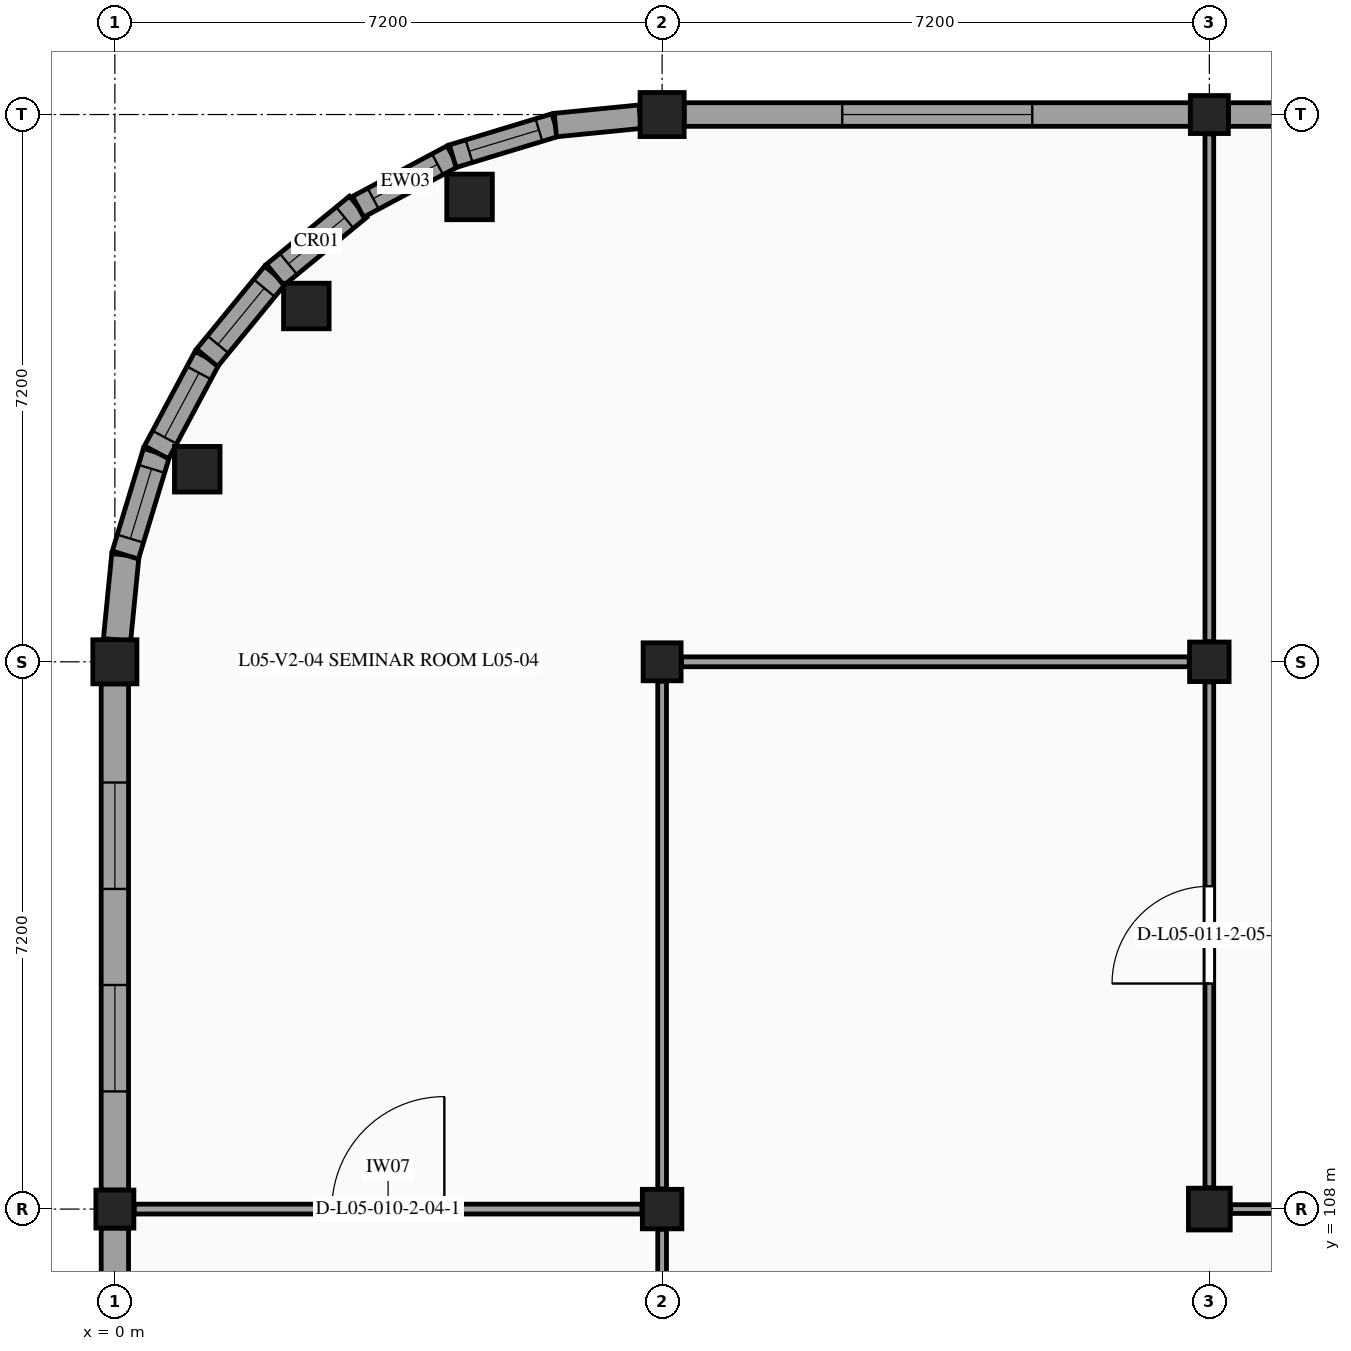
"""IFC4 building model, lengths in metres.
Left out: names, types, materials, properties, quantities, classifications, styles, units other than length and angle.
Written with IfcOpenShell. Run it as: python <this file> out.ifc"""

import sys

from ifc_helpers import new_model, si_unit, direction, frame, frame_2d, origin, origin_2d, place, context, subcontext, project, spatial, rectangle, circle, extrude, element, fill, save


model = new_model("IFC4")
c1 = context("Model", 3, precision=1e-05, world=origin(), true_north=direction((0.0, 1.0)))
c2 = subcontext(c1, "Body", "Model", "MODEL_VIEW")
j1 = project(units=[si_unit("LENGTHUNIT", "METRE"), si_unit("PLANEANGLEUNIT", "RADIAN")], contexts=[c1])
p1 = place(None, origin())
s1 = spatial("IfcSite", under=j1, at=p1, CompositionType="ELEMENT")
p2 = place(p1, origin())
s2 = spatial("IfcBuilding", under=s1, at=p2, CompositionType="ELEMENT")
p3 = place(p2, frame((0.0, 0.0, 22.8)))
s3 = spatial("IfcBuildingStorey", under=s2, at=p3, CompositionType="ELEMENT", Elevation=22.8)
p4 = place(p3, frame((0.0, 108.0, 0.0), z_axis=(0.0, 0.0, 1.0), x_axis=(1.0, 0.0, 0.0)))
e1 = element("IfcColumn", 1, at=p4, inside=s3, PredefinedType="COLUMN", context=c2, shape_type="SweptSolid", body=[
    extrude(rectangle(XDim=0.5, YDim=0.5, at=origin_2d()), origin(), (0.0, 0.0, 1.0), 3.9),
])
p5 = place(p3, frame((0.0, 115.2, 0.0), z_axis=(0.0, 0.0, 1.0), x_axis=(1.0, 0.0, 0.0)))
e2 = element("IfcColumn", 2, at=p5, inside=s3, PredefinedType="COLUMN", context=c2, shape_type="SweptSolid", body=[
    extrude(rectangle(XDim=0.58, YDim=0.58, at=origin_2d()), origin(), (0.0, 0.0, 1.0), 3.9),
])
p6 = place(p3, frame((7.2, 108.0, 0.0), z_axis=(0.0, 0.0, 1.0), x_axis=(1.0, 0.0, 0.0)))
e3 = element("IfcColumn", 3, at=p6, inside=s3, PredefinedType="COLUMN", context=c2, shape_type="SweptSolid", body=[
    extrude(rectangle(XDim=0.52, YDim=0.52, at=origin_2d()), origin(), (0.0, 0.0, 1.0), 3.9),
])
p7 = place(p3, frame((7.2, 115.2, 0.0), z_axis=(0.0, 0.0, 1.0), x_axis=(1.0, 0.0, 0.0)))
e4 = element("IfcColumn", 4, at=p7, inside=s3, PredefinedType="COLUMN", context=c2, shape_type="SweptSolid", body=[
    extrude(rectangle(XDim=0.5, YDim=0.5, at=origin_2d()), origin(), (0.0, 0.0, 1.0), 3.9),
])
p8 = place(p3, frame((7.2, 122.4, 0.0), z_axis=(0.0, 0.0, 1.0), x_axis=(1.0, 0.0, 0.0)))
e5 = element("IfcColumn", 5, at=p8, inside=s3, PredefinedType="COLUMN", context=c2, shape_type="SweptSolid", body=[
    extrude(rectangle(XDim=0.58, YDim=0.58, at=origin_2d()), origin(), (0.0, 0.0, 1.0), 3.9),
])
p9 = place(p3, frame((14.4, 108.0, 0.0), z_axis=(0.0, 0.0, 1.0), x_axis=(1.0, 0.0, 0.0)))
e6 = element("IfcColumn", 6, at=p9, inside=s3, PredefinedType="COLUMN", context=c2, shape_type="SweptSolid", body=[
    extrude(rectangle(XDim=0.55, YDim=0.55, at=origin_2d()), origin(), (0.0, 0.0, 1.0), 3.9),
])
p10 = place(p3, frame((14.4, 115.2, 0.0), z_axis=(0.0, 0.0, 1.0), x_axis=(1.0, 0.0, 0.0)))
e7 = element("IfcColumn", 7, at=p10, inside=s3, PredefinedType="COLUMN", context=c2, shape_type="SweptSolid", body=[
    extrude(rectangle(XDim=0.52, YDim=0.52, at=origin_2d()), origin(), (0.0, 0.0, 1.0), 3.9),
])
p11 = place(p3, frame((14.4, 122.4, 0.0), z_axis=(0.0, 0.0, 1.0), x_axis=(1.0, 0.0, 0.0)))
e8 = element("IfcColumn", 8, at=p11, inside=s3, PredefinedType="COLUMN", context=c2, shape_type="SweptSolid", body=[
    extrude(rectangle(XDim=0.5, YDim=0.5, at=origin_2d()), origin(), (0.0, 0.0, 1.0), 3.9),
])
for number, where, z_axis, x_axis in (
    (9, (4.667, 121.316, 0.0), (0.0, 0.0, 1.0), (1.0, 0.0, 0.0)),
    (10, (2.519, 119.881, 0.0), (0.0, 0.0, 1.0), (1.0, 0.0, 0.0)),
    (11, (1.084, 117.733, 0.0), (0.0, 0.0, 1.0), (1.0, 0.0, 0.0)),
):
    element("IfcColumn", number, at=place(p3, frame(where, z_axis=z_axis, x_axis=x_axis)), inside=s3, PredefinedType="COLUMN", context=c2, shape_type="SweptSolid", body=[
        extrude(circle(Radius=0.3, at=origin_2d()), origin(), (0.0, 0.0, 1.0), 3.9),
    ])
p12 = place(p3, frame((0.0, 101.06, 0.0), z_axis=(0.0, 0.0, 1.0), x_axis=(0.0, 1.0, 0.0)))
e12 = element("IfcWall", 12, at=p12, inside=s3, PredefinedType="STANDARD", context=c2, shape_type="SweptSolid", body=[
    extrude(rectangle(XDim=6.69, YDim=0.36, at=frame_2d((3.345, 0.0))), origin(), (0.0, 0.0, 1.0), 3.095),
])
p13 = place(p12, frame((1.232, 0.0, 1.15)))
e13 = element("IfcOpeningElement", 13, at=p13, cuts=e12, PredefinedType="OPENING", context=c2, shape_type="SweptSolid", body=[
    extrude(rectangle(XDim=1.55, YDim=1.35, at=frame_2d((0.775, 0.675))), frame((0.0, 0.19, 0.0), z_axis=(0.0, -1.0, 0.0), x_axis=(1.0, 0.0, 0.0)), (0.0, 0.0, 1.0), 0.38),
])
p14 = place(p12, frame((3.908, 0.0, 1.15)))
e14 = element("IfcOpeningElement", 14, at=p14, cuts=e12, PredefinedType="OPENING", context=c2, shape_type="SweptSolid", body=[
    extrude(rectangle(XDim=1.55, YDim=1.35, at=frame_2d((0.775, 0.675))), frame((0.0, 0.19, 0.0), z_axis=(0.0, -1.0, 0.0), x_axis=(1.0, 0.0, 0.0)), (0.0, 0.0, 1.0), 0.38),
])
p15 = place(p3, frame((0.0, 108.25, 0.0), z_axis=(0.0, 0.0, 1.0), x_axis=(0.0, 1.0, 0.0)))
e15 = element("IfcWall", 15, at=p15, inside=s3, PredefinedType="STANDARD", context=c2, shape_type="SweptSolid", body=[
    extrude(rectangle(XDim=6.66, YDim=0.36, at=frame_2d((3.33, 0.0))), origin(), (0.0, 0.0, 1.0), 3.095),
])
p16 = place(p15, frame((1.298, 0.0, 1.15)))
e16 = element("IfcOpeningElement", 16, at=p16, cuts=e15, PredefinedType="OPENING", context=c2, shape_type="SweptSolid", body=[
    extrude(rectangle(XDim=1.4, YDim=1.3, at=frame_2d((0.7, 0.65))), frame((0.0, 0.19, 0.0), z_axis=(0.0, -1.0, 0.0), x_axis=(1.0, 0.0, 0.0)), (0.0, 0.0, 1.0), 0.38),
])
p17 = place(p15, frame((3.962, 0.0, 1.15)))
e17 = element("IfcOpeningElement", 17, at=p17, cuts=e15, PredefinedType="OPENING", context=c2, shape_type="SweptSolid", body=[
    extrude(rectangle(XDim=1.4, YDim=1.3, at=frame_2d((0.7, 0.65))), frame((0.0, 0.19, 0.0), z_axis=(0.0, -1.0, 0.0), x_axis=(1.0, 0.0, 0.0)), (0.0, 0.0, 1.0), 0.38),
])
p18 = place(p3, frame((0.028, 115.489, 0.0), z_axis=(0.0, 0.0, 1.0), x_axis=(0.098167460497, 0.995169909965, 0.0)))
e18 = element("IfcWall", 18, at=p18, inside=s3, PredefinedType="STANDARD", context=c2, shape_type="SweptSolid", body=[
    extrude(rectangle(XDim=1.122, YDim=0.36, at=frame_2d((0.561, 0.0))), origin(), (0.0, 0.0, 1.0), 3.67),
])
p19 = place(p3, frame((0.138, 116.605, 0.0), z_axis=(0.0, 0.0, 1.0), x_axis=(0.290266641956, 0.956945806495, 0.0)))
e19 = element("IfcWall", 19, at=p19, inside=s3, PredefinedType="STANDARD", context=c2, shape_type="SweptSolid", body=[
    extrude(rectangle(XDim=1.411, YDim=0.36, at=frame_2d((0.706, 0.0))), origin(), (0.0, 0.0, 1.0), 3.67),
])
p20 = place(p19, frame((0.226, 0.0, 1.0)))
e20 = element("IfcOpeningElement", 20, at=p20, cuts=e19, PredefinedType="OPENING", context=c2, shape_type="SweptSolid", body=[
    extrude(rectangle(XDim=0.96, YDim=1.4, at=frame_2d((0.48, 0.7))), frame((0.0, 0.19, 0.0), z_axis=(0.0, -1.0, 0.0), x_axis=(1.0, 0.0, 0.0)), (0.0, 0.0, 1.0), 0.38),
])
p21 = place(p3, frame((0.548, 117.955, 0.0), z_axis=(0.0, 0.0, 1.0), x_axis=(0.471333199182, 0.881955222984, 0.0)))
e21 = element("IfcWall", 21, at=p21, inside=s3, PredefinedType="STANDARD", context=c2, shape_type="SweptSolid", body=[
    extrude(rectangle(XDim=1.411, YDim=0.36, at=frame_2d((0.706, 0.0))), origin(), (0.0, 0.0, 1.0), 3.67),
])
p22 = place(p21, frame((0.226, 0.0, 1.0)))
e22 = element("IfcOpeningElement", 22, at=p22, cuts=e21, PredefinedType="OPENING", context=c2, shape_type="SweptSolid", body=[
    extrude(rectangle(XDim=0.96, YDim=1.4, at=frame_2d((0.48, 0.7))), frame((0.0, 0.19, 0.0), z_axis=(0.0, -1.0, 0.0), x_axis=(1.0, 0.0, 0.0)), (0.0, 0.0, 1.0), 0.38),
])
p23 = place(p3, frame((1.213, 119.2, 0.0), z_axis=(0.0, 0.0, 1.0), x_axis=(0.634433227965, 0.772977670605, 0.0)))
e23 = element("IfcWall", 23, at=p23, inside=s3, PredefinedType="STANDARD", context=c2, shape_type="SweptSolid", body=[
    extrude(rectangle(XDim=1.412, YDim=0.36, at=frame_2d((0.706, 0.0))), origin(), (0.0, 0.0, 1.0), 3.67),
])
p24 = place(p23, frame((0.226, 0.0, 1.0)))
e24 = element("IfcOpeningElement", 24, at=p24, cuts=e23, PredefinedType="OPENING", context=c2, shape_type="SweptSolid", body=[
    extrude(rectangle(XDim=0.96, YDim=1.4, at=frame_2d((0.48, 0.7))), frame((0.0, 0.19, 0.0), z_axis=(0.0, -1.0, 0.0), x_axis=(1.0, 0.0, 0.0)), (0.0, 0.0, 1.0), 0.38),
])
p25 = place(p3, frame((2.109, 120.291, 0.0), z_axis=(0.0, 0.0, 1.0), x_axis=(0.773062495189, 0.63432986571, 0.0)))
e25 = element("IfcWall", 25, at=p25, inside=s3, PredefinedType="STANDARD", context=c2, shape_type="SweptSolid", body=[
    extrude(rectangle(XDim=1.411, YDim=0.36, at=frame_2d((0.706, 0.0))), origin(), (0.0, 0.0, 1.0), 3.67),
])
p26 = place(p25, frame((0.226, 0.0, 1.0)))
e26 = element("IfcOpeningElement", 26, at=p26, cuts=e25, PredefinedType="OPENING", context=c2, shape_type="SweptSolid", body=[
    extrude(rectangle(XDim=0.96, YDim=1.4, at=frame_2d((0.48, 0.7))), frame((0.0, 0.19, 0.0), z_axis=(0.0, -1.0, 0.0), x_axis=(1.0, 0.0, 0.0)), (0.0, 0.0, 1.0), 0.38),
])
p27 = place(p3, frame((3.2, 121.187, 0.0), z_axis=(0.0, 0.0, 1.0), x_axis=(0.881844864465, 0.471539643102, 0.0)))
e27 = element("IfcWall", 27, at=p27, inside=s3, PredefinedType="STANDARD", context=c2, shape_type="SweptSolid", body=[
    extrude(rectangle(XDim=1.411, YDim=0.31, at=frame_2d((0.706, 0.0))), origin(), (0.0, 0.0, 1.0), 3.67),
])
p28 = place(p27, frame((0.226, 0.0, 1.0)))
e28 = element("IfcOpeningElement", 28, at=p28, cuts=e27, PredefinedType="OPENING", context=c2, shape_type="SweptSolid", body=[
    extrude(rectangle(XDim=0.96, YDim=1.4, at=frame_2d((0.48, 0.7))), frame((0.0, 0.165, 0.0), z_axis=(0.0, -1.0, 0.0), x_axis=(1.0, 0.0, 0.0)), (0.0, 0.0, 1.0), 0.33),
])
p29 = place(p3, frame((4.445, 121.852, 0.0), z_axis=(0.0, 0.0, 1.0), x_axis=(0.95696037757, 0.290218599957, 0.0)))
e29 = element("IfcWall", 29, at=p29, inside=s3, PredefinedType="STANDARD", context=c2, shape_type="SweptSolid", body=[
    extrude(rectangle(XDim=1.412, YDim=0.31, at=frame_2d((0.706, 0.0))), origin(), (0.0, 0.0, 1.0), 3.67),
])
p30 = place(p29, frame((0.226, 0.0, 1.0)))
e30 = element("IfcOpeningElement", 30, at=p30, cuts=e29, PredefinedType="OPENING", context=c2, shape_type="SweptSolid", body=[
    extrude(rectangle(XDim=0.96, YDim=1.4, at=frame_2d((0.48, 0.7))), frame((0.0, 0.165, 0.0), z_axis=(0.0, -1.0, 0.0), x_axis=(1.0, 0.0, 0.0)), (0.0, 0.0, 1.0), 0.33),
])
p31 = place(p3, frame((5.795, 122.262, 0.0), z_axis=(0.0, 0.0, 1.0), x_axis=(0.995189062464, 0.097973108315, 0.0)))
e31 = element("IfcWall", 31, at=p31, inside=s3, PredefinedType="STANDARD", context=c2, shape_type="SweptSolid", body=[
    extrude(rectangle(XDim=1.121, YDim=0.31, at=frame_2d((0.561, 0.0))), origin(), (0.0, 0.0, 1.0), 3.67),
])
p32 = place(p3, frame((7.49, 122.4, 0.0), z_axis=(0.0, 0.0, 1.0), x_axis=(1.0, 0.0, 0.0)))
e32 = element("IfcWall", 32, at=p32, inside=s3, PredefinedType="STANDARD", context=c2, shape_type="SweptSolid", body=[
    extrude(rectangle(XDim=6.66, YDim=0.31, at=frame_2d((3.33, 0.0))), origin(), (0.0, 0.0, 1.0), 3.095),
])
p33 = place(p32, frame((2.08, 0.0, 0.98)))
e33 = element("IfcOpeningElement", 33, at=p33, cuts=e32, PredefinedType="OPENING", context=c2, shape_type="SweptSolid", body=[
    extrude(rectangle(XDim=2.5, YDim=1.35, at=frame_2d((1.25, 0.675))), frame((0.0, 0.165, 0.0), z_axis=(0.0, -1.0, 0.0), x_axis=(1.0, 0.0, 0.0)), (0.0, 0.0, 1.0), 0.33),
])
p34 = place(p3, frame((14.65, 122.4, 0.0), z_axis=(0.0, 0.0, 1.0), x_axis=(1.0, 0.0, 0.0)))
e34 = element("IfcWall", 34, at=p34, inside=s3, PredefinedType="STANDARD", context=c2, shape_type="SweptSolid", body=[
    extrude(rectangle(XDim=6.69, YDim=0.31, at=frame_2d((3.345, 0.0))), origin(), (0.0, 0.0, 1.0), 3.095),
])
p35 = place(p34, frame((2.295, 0.0, 0.98)))
e35 = element("IfcOpeningElement", 35, at=p35, cuts=e34, PredefinedType="OPENING", context=c2, shape_type="SweptSolid", body=[
    extrude(rectangle(XDim=2.1, YDim=1.3, at=frame_2d((1.05, 0.65))), frame((0.0, 0.165, 0.0), z_axis=(0.0, -1.0, 0.0), x_axis=(1.0, 0.0, 0.0)), (0.0, 0.0, 1.0), 0.33),
])
p36 = place(p3, frame((7.2, 101.08, 0.0), z_axis=(0.0, 0.0, 1.0), x_axis=(0.0, 1.0, 0.0)))
e36 = element("IfcWall", 36, at=p36, inside=s3, PredefinedType="PARTITIONING", context=c2, shape_type="SweptSolid", body=[
    extrude(rectangle(XDim=6.655, YDim=0.115, at=frame_2d((3.328, 0.0))), origin(), (0.0, 0.0, 1.0), 3.205),
])
p37 = place(p36, frame((2.528, 0.0, 0.0)))
e37 = element("IfcOpeningElement", 37, at=p37, cuts=e36, PredefinedType="OPENING", context=c2, shape_type="SweptSolid", body=[
    extrude(rectangle(XDim=1.6, YDim=2.2, at=frame_2d((0.8, 1.1))), frame((0.0, 0.067, 0.0), z_axis=(0.0, -1.0, 0.0), x_axis=(1.0, 0.0, 0.0)), (0.0, 0.0, 1.0), 0.135),
])
p38 = place(p3, frame((0.255, 108.0, 0.0), z_axis=(0.0, 0.0, 1.0), x_axis=(1.0, 0.0, 0.0)))
e38 = element("IfcWall", 38, at=p38, inside=s3, PredefinedType="PARTITIONING", context=c2, shape_type="SweptSolid", body=[
    extrude(rectangle(XDim=6.68, YDim=0.13, at=frame_2d((3.34, 0.0))), origin(), (0.0, 0.0, 1.0), 3.2),
])
p39 = place(p38, frame((2.6, 0.0, 0.0)))
e39 = element("IfcOpeningElement", 39, at=p39, cuts=e38, PredefinedType="OPENING", context=c2, shape_type="SweptSolid", body=[
    extrude(rectangle(XDim=1.48, YDim=2.28, at=frame_2d((0.74, 1.14))), frame((0.0, 0.075, 0.0), z_axis=(0.0, -1.0, 0.0), x_axis=(1.0, 0.0, 0.0)), (0.0, 0.0, 1.0), 0.15),
])
p40 = place(p3, frame((7.2, 108.265, 0.0), z_axis=(0.0, 0.0, 1.0), x_axis=(0.0, 1.0, 0.0)))
e40 = element("IfcWall", 40, at=p40, inside=s3, PredefinedType="PARTITIONING", context=c2, shape_type="SweptSolid", body=[
    extrude(rectangle(XDim=6.68, YDim=0.115, at=frame_2d((3.34, 0.0))), origin(), (0.0, 0.0, 1.0), 3.27),
])
p41 = place(p3, frame((14.4, 108.28, 0.0), z_axis=(0.0, 0.0, 1.0), x_axis=(0.0, 1.0, 0.0)))
e41 = element("IfcWall", 41, at=p41, inside=s3, PredefinedType="PARTITIONING", context=c2, shape_type="SweptSolid", body=[
    extrude(rectangle(XDim=6.655, YDim=0.115, at=frame_2d((3.328, 0.0))), origin(), (0.0, 0.0, 1.0), 3.27),
])
p42 = place(p41, frame((2.688, 0.0, 0.0)))
e42 = element("IfcOpeningElement", 42, at=p42, cuts=e41, PredefinedType="OPENING", context=c2, shape_type="SweptSolid", body=[
    extrude(rectangle(XDim=1.28, YDim=2.24, at=frame_2d((0.64, 1.12))), frame((0.0, 0.067, 0.0), z_axis=(0.0, -1.0, 0.0), x_axis=(1.0, 0.0, 0.0)), (0.0, 0.0, 1.0), 0.135),
])
p43 = place(p3, frame((7.455, 115.2, 0.0), z_axis=(0.0, 0.0, 1.0), x_axis=(1.0, 0.0, 0.0)))
e43 = element("IfcWall", 43, at=p43, inside=s3, PredefinedType="PARTITIONING", context=c2, shape_type="SweptSolid", body=[
    extrude(rectangle(XDim=6.68, YDim=0.13, at=frame_2d((3.34, 0.0))), origin(), (0.0, 0.0, 1.0), 3.24),
])
p44 = place(p3, frame((14.4, 115.465, 0.0), z_axis=(0.0, 0.0, 1.0), x_axis=(0.0, 1.0, 0.0)))
e44 = element("IfcWall", 44, at=p44, inside=s3, PredefinedType="PARTITIONING", context=c2, shape_type="SweptSolid", body=[
    extrude(rectangle(XDim=6.68, YDim=0.115, at=frame_2d((3.34, 0.0))), origin(), (0.0, 0.0, 1.0), 3.265),
])
p45 = place(p3, frame((14.68, 108.0, 0.0), z_axis=(0.0, 0.0, 1.0), x_axis=(1.0, 0.0, 0.0)))
e45 = element("IfcWall", 45, at=p45, inside=s3, PredefinedType="PARTITIONING", context=c2, shape_type="SweptSolid", body=[
    extrude(rectangle(XDim=6.625, YDim=0.115, at=frame_2d((3.312, 0.0))), origin(), (0.0, 0.0, 1.0), 3.25),
])
p46 = place(p16, origin())
e46 = element("IfcWindow", 46, at=p46, inside=s3, PartitioningType="SINGLE_PANEL", PredefinedType="WINDOW", context=c2, shape_type="SweptSolid", body=[
    extrude(rectangle(XDim=1.4, YDim=1.3, at=frame_2d((0.7, 0.65))), frame((0.0, -0.08, 0.0), z_axis=(0.0, -1.0, 0.0), x_axis=(1.0, 0.0, 0.0)), (0.0, 0.0, 1.0), 0.06),
])
fill(e16, e46)
p47 = place(p17, origin())
e47 = element("IfcWindow", 47, at=p47, inside=s3, PartitioningType="SINGLE_PANEL", PredefinedType="WINDOW", context=c2, shape_type="SweptSolid", body=[
    extrude(rectangle(XDim=1.4, YDim=1.3, at=frame_2d((0.7, 0.65))), frame((0.0, -0.08, 0.0), z_axis=(0.0, -1.0, 0.0), x_axis=(1.0, 0.0, 0.0)), (0.0, 0.0, 1.0), 0.06),
])
fill(e17, e47)
p48 = place(p20, origin())
e48 = element("IfcWindow", 48, at=p48, inside=s3, PartitioningType="SINGLE_PANEL", PredefinedType="WINDOW", context=c2, shape_type="SweptSolid", body=[
    extrude(rectangle(XDim=0.96, YDim=1.4, at=frame_2d((0.48, 0.7))), frame((0.0, -0.01, 0.0), z_axis=(0.0, -1.0, 0.0), x_axis=(1.0, 0.0, 0.0)), (0.0, 0.0, 1.0), 0.06),
])
fill(e20, e48)
p49 = place(p22, origin())
e49 = element("IfcWindow", 49, at=p49, inside=s3, PartitioningType="SINGLE_PANEL", PredefinedType="WINDOW", context=c2, shape_type="SweptSolid", body=[
    extrude(rectangle(XDim=0.96, YDim=1.4, at=frame_2d((0.48, 0.7))), frame((0.0, -0.01, 0.0), z_axis=(0.0, -1.0, 0.0), x_axis=(1.0, 0.0, 0.0)), (0.0, 0.0, 1.0), 0.06),
])
fill(e22, e49)
p50 = place(p24, origin())
e50 = element("IfcWindow", 50, at=p50, inside=s3, PartitioningType="SINGLE_PANEL", PredefinedType="WINDOW", context=c2, shape_type="SweptSolid", body=[
    extrude(rectangle(XDim=0.96, YDim=1.4, at=frame_2d((0.48, 0.7))), frame((0.0, -0.01, 0.0), z_axis=(0.0, -1.0, 0.0), x_axis=(1.0, 0.0, 0.0)), (0.0, 0.0, 1.0), 0.06),
])
fill(e24, e50)
p51 = place(p26, origin())
e51 = element("IfcWindow", 51, at=p51, inside=s3, PartitioningType="SINGLE_PANEL", PredefinedType="WINDOW", context=c2, shape_type="SweptSolid", body=[
    extrude(rectangle(XDim=0.96, YDim=1.4, at=frame_2d((0.48, 0.7))), frame((0.0, -0.01, 0.0), z_axis=(0.0, -1.0, 0.0), x_axis=(1.0, 0.0, 0.0)), (0.0, 0.0, 1.0), 0.06),
])
fill(e26, e51)
p52 = place(p28, origin())
e52 = element("IfcWindow", 52, at=p52, inside=s3, PartitioningType="SINGLE_PANEL", PredefinedType="WINDOW", context=c2, shape_type="SweptSolid", body=[
    extrude(rectangle(XDim=0.96, YDim=1.4, at=frame_2d((0.48, 0.7))), frame((0.0, -0.01, 0.0), z_axis=(0.0, -1.0, 0.0), x_axis=(1.0, 0.0, 0.0)), (0.0, 0.0, 1.0), 0.06),
])
fill(e28, e52)
p53 = place(p30, origin())
e53 = element("IfcWindow", 53, at=p53, inside=s3, PartitioningType="SINGLE_PANEL", PredefinedType="WINDOW", context=c2, shape_type="SweptSolid", body=[
    extrude(rectangle(XDim=0.96, YDim=1.4, at=frame_2d((0.48, 0.7))), frame((0.0, -0.01, 0.0), z_axis=(0.0, -1.0, 0.0), x_axis=(1.0, 0.0, 0.0)), (0.0, 0.0, 1.0), 0.06),
])
fill(e30, e53)
p54 = place(p33, origin())
e54 = element("IfcWindow", 54, at=p54, inside=s3, PartitioningType="SINGLE_PANEL", PredefinedType="WINDOW", context=c2, shape_type="SweptSolid", body=[
    extrude(rectangle(XDim=2.5, YDim=1.35, at=frame_2d((1.25, 0.675))), frame((0.0, -0.03, 0.0), z_axis=(0.0, -1.0, 0.0), x_axis=(1.0, 0.0, 0.0)), (0.0, 0.0, 1.0), 0.06),
])
fill(e33, e54)
p55 = place(p39, origin())
e55 = element("IfcDoor", 55, at=p55, inside=s3, OperationType="SINGLE_SWING_RIGHT", PredefinedType="DOOR", context=c2, shape_type="SweptSolid", body=[
    extrude(rectangle(XDim=1.48, YDim=2.28, at=frame_2d((0.74, 1.14))), frame((0.0, 0.025, 0.0), z_axis=(0.0, -1.0, 0.0), x_axis=(1.0, 0.0, 0.0)), (0.0, 0.0, 1.0), 0.05),
])
fill(e39, e55)
p56 = place(p42, origin())
e56 = element("IfcDoor", 56, at=p56, inside=s3, OperationType="SINGLE_SWING_LEFT", PredefinedType="DOOR", context=c2, shape_type="SweptSolid", body=[
    extrude(rectangle(XDim=1.28, YDim=2.24, at=frame_2d((0.64, 1.12))), frame((0.0, 0.025, 0.0), z_axis=(0.0, -1.0, 0.0), x_axis=(1.0, 0.0, 0.0)), (0.0, 0.0, 1.0), 0.05),
])
fill(e42, e56)
save(model, sys.argv[1])
